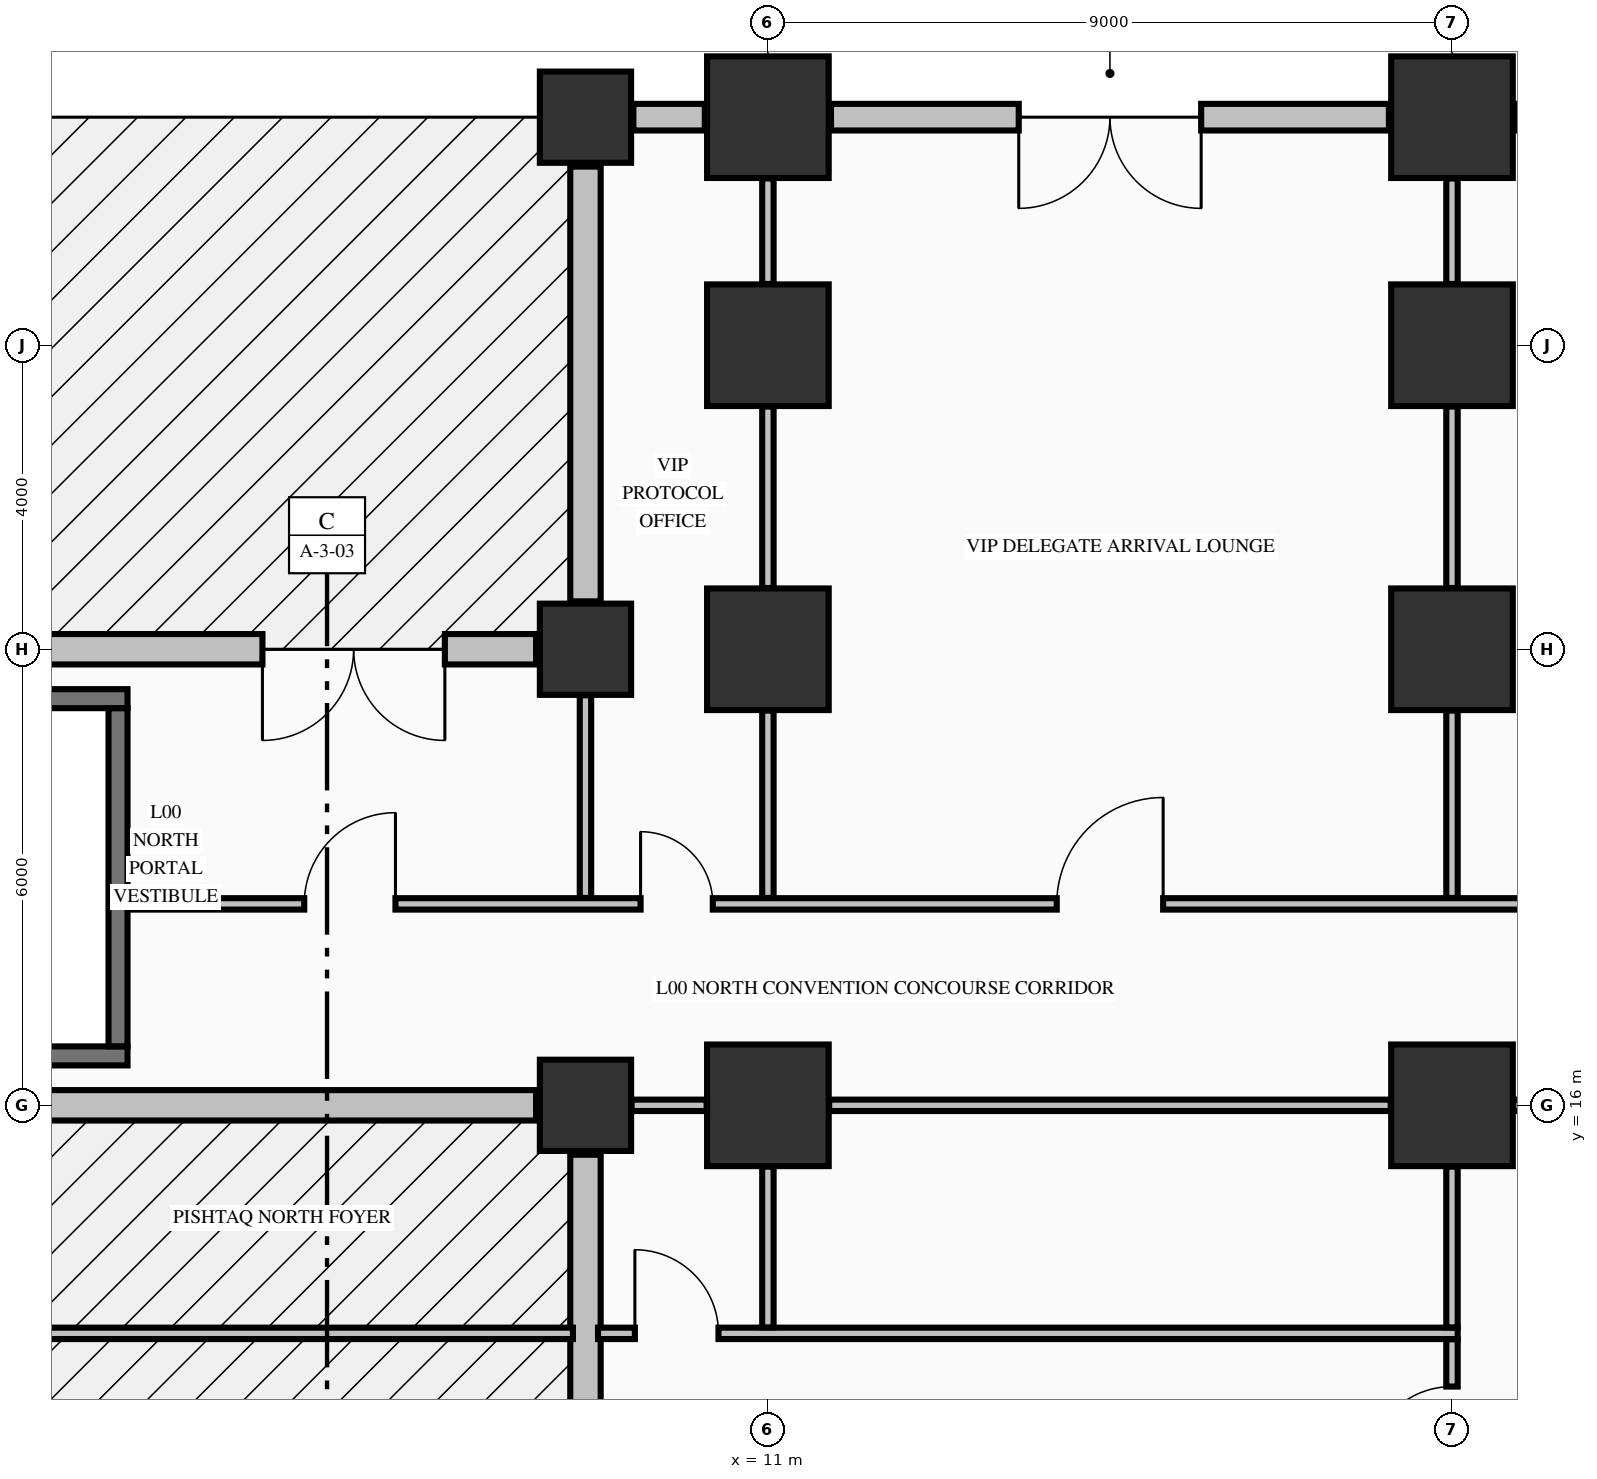
"""IFC4 building model, lengths in metres.
Left out: names, types, materials, properties, quantities, classifications, styles, units other than length and angle.
Written with IfcOpenShell. Run it as: python <this file> out.ifc"""

import sys

from ifc_helpers import new_model, si_unit, direction, frame, frame_2d, origin, origin_2d, place, context, subcontext, project, spatial, rectangle, extrude, element, fill, save


model = new_model("IFC4")
c1 = context("Model", 3, precision=1e-05, world=origin(), true_north=direction((0.0, 1.0)))
c2 = subcontext(c1, "Body", "Model", "MODEL_VIEW")
j1 = project(units=[si_unit("LENGTHUNIT", "METRE"), si_unit("PLANEANGLEUNIT", "RADIAN")], contexts=[c1])
p1 = place(None, origin())
s1 = spatial("IfcSite", under=j1, at=p1, CompositionType="ELEMENT")
p2 = place(p1, origin())
s2 = spatial("IfcBuilding", under=s1, at=p2, CompositionType="ELEMENT")
p3 = place(p2, origin())
s3 = spatial("IfcBuildingStorey", under=s2, at=p3, CompositionType="ELEMENT", Elevation=0.0)
for number, where, z_axis, x_axis in (
    (1, (11.0, 16.0, 0.0), (0.0, 0.0, 1.0), (1.0, 0.0, 0.0)),
    (2, (11.0, 22.0, 0.0), (0.0, 0.0, 1.0), (1.0, 0.0, 0.0)),
    (3, (11.0, 26.0, 0.0), (0.0, 0.0, 1.0), (1.0, 0.0, 0.0)),
    (4, (11.0, 29.0, 0.0), (0.0, 0.0, 1.0), (1.0, 0.0, 0.0)),
    (5, (20.0, 16.0, 0.0), (0.0, 0.0, 1.0), (1.0, 0.0, 0.0)),
    (6, (20.0, 22.0, 0.0), (0.0, 0.0, 1.0), (1.0, 0.0, 0.0)),
    (7, (20.0, 26.0, 0.0), (0.0, 0.0, 1.0), (1.0, 0.0, 0.0)),
    (8, (20.0, 29.0, 0.0), (0.0, 0.0, 1.0), (1.0, 0.0, 0.0)),
):
    element("IfcColumn", number, at=place(p3, frame(where, z_axis=z_axis, x_axis=x_axis)), inside=s3, PredefinedType="COLUMN", context=c2, shape_type="SweptSolid", body=[
        extrude(rectangle(XDim=1.6, YDim=1.6, at=origin_2d()), origin(), (0.0, 0.0, 1.0), 5.09),
    ])
for number, where, z_axis, x_axis in (
    (9, (8.6, 16.0, 0.0), (0.0, 0.0, 1.0), (1.0, 0.0, 0.0)),
    (10, (8.6, 22.0, 0.0), (0.0, 0.0, 1.0), (1.0, 0.0, 0.0)),
    (11, (8.6, 29.0, 0.0), (0.0, 0.0, 1.0), (1.0, 0.0, 0.0)),
):
    element("IfcColumn", number, at=place(p3, frame(where, z_axis=z_axis, x_axis=x_axis)), inside=s3, PredefinedType="COLUMN", context=c2, shape_type="SweptSolid", body=[
        extrude(rectangle(XDim=1.2, YDim=1.2, at=origin_2d()), origin(), (0.0, 0.0, 1.0), 5.09),
    ])
p4 = place(p3, frame((10.17, 29.0, 0.0), z_axis=(0.0, 0.0, 1.0), x_axis=(-1.0, 0.0, 0.0)))
e12 = element("IfcWall", 12, at=p4, inside=s3, PredefinedType="STANDARD", context=c2, shape_type="SweptSolid", body=[
    extrude(rectangle(XDim=0.94, YDim=0.35, at=frame_2d((0.47, 0.0))), origin(), (0.0, 0.0, 1.0), 4.482),
])
p5 = place(p3, frame((19.17, 29.0, 0.0), z_axis=(0.0, 0.0, 1.0), x_axis=(-1.0, 0.0, 0.0)))
e13 = element("IfcWall", 13, at=p5, inside=s3, PredefinedType="STANDARD", context=c2, shape_type="SweptSolid", body=[
    extrude(rectangle(XDim=7.34, YDim=0.35, at=frame_2d((3.67, 0.0))), origin(), (0.0, 0.0, 1.0), 4.482),
])
p6 = place(p5, frame((2.47, 0.0, 0.0)))
e14 = element("IfcOpeningElement", 14, at=p6, cuts=e13, PredefinedType="OPENING", context=c2, shape_type="SweptSolid", body=[
    extrude(rectangle(XDim=2.4, YDim=2.6, at=frame_2d((1.2, 1.3))), frame((0.0, 0.185, 0.0), z_axis=(0.0, -1.0, 0.0), x_axis=(1.0, 0.0, 0.0)), (0.0, 0.0, 1.0), 0.37),
])
p7 = place(p3, frame((22.62, 29.0, 0.0), z_axis=(0.0, 0.0, 1.0), x_axis=(-1.0, 0.0, 0.0)))
e15 = element("IfcWall", 15, at=p7, inside=s3, PredefinedType="STANDARD", context=c2, shape_type="SweptSolid", body=[
    extrude(rectangle(XDim=1.79, YDim=0.35, at=frame_2d((0.895, 0.0))), origin(), (0.0, 0.0, 1.0), 4.482),
])
p8 = place(p3, frame((8.6, 15.35, 0.0), z_axis=(0.0, 0.0, 1.0), x_axis=(0.0, -1.0, 0.0)))
e16 = element("IfcWall", 16, at=p8, inside=s3, PredefinedType="STANDARD", context=c2, shape_type="SweptSolid", body=[
    extrude(rectangle(XDim=14.7, YDim=0.4, at=frame_2d((7.35, 0.0))), origin(), (0.0, 0.0, 1.0), 4.132),
])
p9 = place(p3, frame((0.73, 16.0, 0.0), z_axis=(0.0, 0.0, 1.0), x_axis=(1.0, 0.0, 0.0)))
e17 = element("IfcWall", 17, at=p9, inside=s3, PredefinedType="STANDARD", context=c2, shape_type="SweptSolid", body=[
    extrude(rectangle(XDim=7.22, YDim=0.4, at=frame_2d((3.61, 0.0))), origin(), (0.0, 0.0, 1.0), 4.132),
])
p10 = place(p3, frame((8.6, 28.35, 0.0), z_axis=(0.0, 0.0, 1.0), x_axis=(0.0, -1.0, 0.0)))
e18 = element("IfcWall", 18, at=p10, inside=s3, PredefinedType="STANDARD", context=c2, shape_type="SweptSolid", body=[
    extrude(rectangle(XDim=5.72, YDim=0.4, at=frame_2d((2.86, 0.0))), origin(), (0.0, 0.0, 1.0), 4.132),
])
p11 = place(p3, frame((7.95, 22.0, 0.0), z_axis=(0.0, 0.0, 1.0), x_axis=(-1.0, 0.0, 0.0)))
e19 = element("IfcWall", 19, at=p11, inside=s3, PredefinedType="STANDARD", context=c2, shape_type="SweptSolid", body=[
    extrude(rectangle(XDim=15.9, YDim=0.4, at=frame_2d((7.95, 0.0))), origin(), (0.0, 0.0, 1.0), 4.132),
])
p12 = place(p11, frame((1.2, 0.0, 0.0)))
e20 = element("IfcOpeningElement", 20, at=p12, cuts=e19, PredefinedType="OPENING", context=c2, shape_type="SweptSolid", body=[
    extrude(rectangle(XDim=2.4, YDim=2.6, at=frame_2d((1.2, 1.3))), frame((0.0, 0.21, 0.0), z_axis=(0.0, -1.0, 0.0), x_axis=(1.0, 0.0, 0.0)), (0.0, 0.0, 1.0), 0.42),
])
p13 = place(p3, frame((0.704, 16.65, 0.0), z_axis=(0.0, 0.0, 1.0), x_axis=(1.0, 0.0, 0.0)))
e21 = element("IfcWall", 21, at=p13, inside=s3, PredefinedType="SOLIDWALL", context=c2, shape_type="SweptSolid", body=[
    extrude(rectangle(XDim=1.871, YDim=0.25, at=frame_2d((0.936, 0.0))), origin(), (0.0, 0.0, 1.0), 5.09),
])
p14 = place(p3, frame((-7.996, 21.35, 0.0), z_axis=(0.0, 0.0, 1.0), x_axis=(1.0, 0.0, 0.0)))
e22 = element("IfcWall", 22, at=p14, inside=s3, PredefinedType="SOLIDWALL", context=c2, shape_type="SweptSolid", body=[
    extrude(rectangle(XDim=10.571, YDim=0.25, at=frame_2d((5.286, 0.0))), origin(), (0.0, 0.0, 1.0), 5.09),
])
p15 = place(p3, frame((-8.435, 13.0, 0.0), z_axis=(0.0, 0.0, 1.0), x_axis=(1.0, 0.0, 0.0)))
e23 = element("IfcWall", 23, at=p15, inside=s3, PredefinedType="PARTITIONING", context=c2, shape_type="SweptSolid", body=[
    extrude(rectangle(XDim=16.87, YDim=0.15, at=frame_2d((8.435, 0.0))), origin(), (0.0, 0.0, 1.0), 5.09),
])
p16 = place(p15, frame((7.835, 0.0, 0.0)))
e24 = element("IfcOpeningElement", 24, at=p16, cuts=e23, PredefinedType="OPENING", context=c2, shape_type="SweptSolid", body=[
    extrude(rectangle(XDim=1.2, YDim=2.15, at=frame_2d((0.6, 1.075))), frame((0.0, 0.085, 0.0), z_axis=(0.0, -1.0, 0.0), x_axis=(1.0, 0.0, 0.0)), (0.0, 0.0, 1.0), 0.17),
])
p17 = place(p3, frame((8.765, 13.0, 0.0), z_axis=(0.0, 0.0, 1.0), x_axis=(1.0, 0.0, 0.0)))
e25 = element("IfcWall", 25, at=p17, inside=s3, PredefinedType="PARTITIONING", context=c2, shape_type="SweptSolid", body=[
    extrude(rectangle(XDim=11.31, YDim=0.15, at=frame_2d((5.655, 0.0))), origin(), (0.0, 0.0, 1.0), 5.09),
])
p18 = place(p17, frame((0.485, 0.0, 0.0)))
e26 = element("IfcOpeningElement", 26, at=p18, cuts=e25, PredefinedType="OPENING", context=c2, shape_type="SweptSolid", body=[
    extrude(rectangle(XDim=1.1, YDim=2.15, at=frame_2d((0.55, 1.075))), frame((0.0, 0.085, 0.0), z_axis=(0.0, -1.0, 0.0), x_axis=(1.0, 0.0, 0.0)), (0.0, 0.0, 1.0), 0.17),
])
p19 = place(p3, frame((9.206, 16.0, 0.0), z_axis=(0.0, 0.0, 1.0), x_axis=(1.0, 0.0, 0.0)))
e27 = element("IfcWall", 27, at=p19, inside=s3, PredefinedType="PARTITIONING", context=c2, shape_type="SweptSolid", body=[
    extrude(rectangle(XDim=0.988, YDim=0.15, at=frame_2d((0.494, 0.0))), origin(), (0.0, 0.0, 1.0), 4.132),
])
p20 = place(p3, frame((11.806, 16.0, 0.0), z_axis=(0.0, 0.0, 1.0), x_axis=(1.0, 0.0, 0.0)))
e28 = element("IfcWall", 28, at=p20, inside=s3, PredefinedType="PARTITIONING", context=c2, shape_type="SweptSolid", body=[
    extrude(rectangle(XDim=7.388, YDim=0.15, at=frame_2d((3.694, 0.0))), origin(), (0.0, 0.0, 1.0), 4.132),
])
p21 = place(p3, frame((20.806, 16.0, 0.0), z_axis=(0.0, 0.0, 1.0), x_axis=(1.0, 0.0, 0.0)))
e29 = element("IfcWall", 29, at=p21, inside=s3, PredefinedType="PARTITIONING", context=c2, shape_type="SweptSolid", body=[
    extrude(rectangle(XDim=4.488, YDim=0.15, at=frame_2d((2.244, 0.0))), origin(), (0.0, 0.0, 1.0), 4.132),
])
p22 = place(p21, frame((0.15, 0.0, 0.0)))
e30 = element("IfcOpeningElement", 30, at=p22, cuts=e29, PredefinedType="OPENING", context=c2, shape_type="SweptSolid", body=[
    extrude(rectangle(XDim=1.1, YDim=2.15, at=frame_2d((0.55, 1.075))), frame((0.0, 0.085, 0.0), z_axis=(0.0, -1.0, 0.0), x_axis=(1.0, 0.0, 0.0)), (0.0, 0.0, 1.0), 0.17),
])
p23 = place(p3, frame((2.578, 18.65, 0.0), z_axis=(0.0, 0.0, 1.0), x_axis=(1.0, 0.0, 0.0)))
e31 = element("IfcWall", 31, at=p23, inside=s3, PredefinedType="PARTITIONING", context=c2, shape_type="SweptSolid", body=[
    extrude(rectangle(XDim=27.272, YDim=0.15, at=frame_2d((13.636, 0.0))), origin(), (0.0, 0.0, 1.0), 5.09),
])
p24 = place(p23, frame((2.322, 0.0, 0.0)))
e32 = element("IfcOpeningElement", 32, at=p24, cuts=e31, PredefinedType="OPENING", context=c2, shape_type="SweptSolid", body=[
    extrude(rectangle(XDim=1.2, YDim=2.15, at=frame_2d((0.6, 1.075))), frame((0.0, 0.085, 0.0), z_axis=(0.0, -1.0, 0.0), x_axis=(1.0, 0.0, 0.0)), (0.0, 0.0, 1.0), 0.17),
])
p25 = place(p23, frame((6.747, 0.0, 0.0)))
e33 = element("IfcOpeningElement", 33, at=p25, cuts=e31, PredefinedType="OPENING", context=c2, shape_type="SweptSolid", body=[
    extrude(rectangle(XDim=0.95, YDim=2.15, at=frame_2d((0.475, 1.075))), frame((0.0, 0.085, 0.0), z_axis=(0.0, -1.0, 0.0), x_axis=(1.0, 0.0, 0.0)), (0.0, 0.0, 1.0), 0.17),
])
p26 = place(p23, frame((12.222, 0.0, 0.0)))
e34 = element("IfcOpeningElement", 34, at=p26, cuts=e31, PredefinedType="OPENING", context=c2, shape_type="SweptSolid", body=[
    extrude(rectangle(XDim=1.4, YDim=2.2, at=frame_2d((0.7, 1.1))), frame((0.0, 0.085, 0.0), z_axis=(0.0, -1.0, 0.0), x_axis=(1.0, 0.0, 0.0)), (0.0, 0.0, 1.0), 0.17),
])
p27 = place(p23, frame((19.897, 0.0, 0.0)))
e35 = element("IfcOpeningElement", 35, at=p27, cuts=e31, PredefinedType="OPENING", context=c2, shape_type="SweptSolid", body=[
    extrude(rectangle(XDim=1.05, YDim=2.15, at=frame_2d((0.525, 1.075))), frame((0.0, 0.085, 0.0), z_axis=(0.0, -1.0, 0.0), x_axis=(1.0, 0.0, 0.0)), (0.0, 0.0, 1.0), 0.17),
])
p28 = place(p23, frame((24.897, 0.0, 0.0)))
e36 = element("IfcOpeningElement", 36, at=p28, cuts=e31, PredefinedType="OPENING", context=c2, shape_type="SweptSolid", body=[
    extrude(rectangle(XDim=0.95, YDim=2.15, at=frame_2d((0.475, 1.075))), frame((0.0, 0.085, 0.0), z_axis=(0.0, -1.0, 0.0), x_axis=(1.0, 0.0, 0.0)), (0.0, 0.0, 1.0), 0.17),
])
p29 = place(p3, frame((2.45, 16.777, 0.0), z_axis=(0.0, 0.0, 1.0), x_axis=(0.0, 1.0, 0.0)))
e37 = element("IfcWall", 37, at=p29, inside=s3, PredefinedType="SOLIDWALL", context=c2, shape_type="SweptSolid", body=[
    extrude(rectangle(XDim=4.446, YDim=0.25, at=frame_2d((2.223, 0.0))), origin(), (0.0, 0.0, 1.0), 5.09),
])
p30 = place(p3, frame((8.6, 18.728, 0.0), z_axis=(0.0, 0.0, 1.0), x_axis=(0.0, 1.0, 0.0)))
e38 = element("IfcWall", 38, at=p30, inside=s3, PredefinedType="PARTITIONING", context=c2, shape_type="SweptSolid", body=[
    extrude(rectangle(XDim=2.666, YDim=0.15, at=frame_2d((1.333, 0.0))), origin(), (0.0, 0.0, 1.0), 4.132),
])
p31 = place(p3, frame((11.0, 13.078, 0.0), z_axis=(0.0, 0.0, 1.0), x_axis=(0.0, 1.0, 0.0)))
e39 = element("IfcWall", 39, at=p31, inside=s3, PredefinedType="PARTITIONING", context=c2, shape_type="SweptSolid", body=[
    extrude(rectangle(XDim=2.116, YDim=0.15, at=frame_2d((1.058, 0.0))), origin(), (0.0, 0.0, 1.0), 4.132),
])
p32 = place(p3, frame((11.0, 18.728, 0.0), z_axis=(0.0, 0.0, 1.0), x_axis=(0.0, 1.0, 0.0)))
e40 = element("IfcWall", 40, at=p32, inside=s3, PredefinedType="PARTITIONING", context=c2, shape_type="SweptSolid", body=[
    extrude(rectangle(XDim=2.466, YDim=0.15, at=frame_2d((1.233, 0.0))), origin(), (0.0, 0.0, 1.0), 4.132),
])
p33 = place(p3, frame((11.0, 22.806, 0.0), z_axis=(0.0, 0.0, 1.0), x_axis=(0.0, 1.0, 0.0)))
e41 = element("IfcWall", 41, at=p33, inside=s3, PredefinedType="PARTITIONING", context=c2, shape_type="SweptSolid", body=[
    extrude(rectangle(XDim=2.388, YDim=0.15, at=frame_2d((1.194, 0.0))), origin(), (0.0, 0.0, 1.0), 4.132),
])
p34 = place(p3, frame((11.0, 26.806, 0.0), z_axis=(0.0, 0.0, 1.0), x_axis=(0.0, 1.0, 0.0)))
e42 = element("IfcWall", 42, at=p34, inside=s3, PredefinedType="PARTITIONING", context=c2, shape_type="SweptSolid", body=[
    extrude(rectangle(XDim=1.388, YDim=0.15, at=frame_2d((0.694, 0.0))), origin(), (0.0, 0.0, 1.0), 4.132),
])
p35 = place(p3, frame((20.0, 10.678, 0.0), z_axis=(0.0, 0.0, 1.0), x_axis=(0.0, 1.0, 0.0)))
e43 = element("IfcWall", 43, at=p35, inside=s3, PredefinedType="PARTITIONING", context=c2, shape_type="SweptSolid", body=[
    extrude(rectangle(XDim=2.244, YDim=0.15, at=frame_2d((1.122, 0.0))), origin(), (0.0, 0.0, 1.0), 4.132),
])
p36 = place(p35, frame((0.522, 0.0, 0.0)))
e44 = element("IfcOpeningElement", 44, at=p36, cuts=e43, PredefinedType="OPENING", context=c2, shape_type="SweptSolid", body=[
    extrude(rectangle(XDim=1.1, YDim=2.15, at=frame_2d((0.55, 1.075))), frame((0.0, 0.085, 0.0), z_axis=(0.0, -1.0, 0.0), x_axis=(1.0, 0.0, 0.0)), (0.0, 0.0, 1.0), 0.17),
])
p37 = place(p3, frame((20.0, 13.078, 0.0), z_axis=(0.0, 0.0, 1.0), x_axis=(0.0, 1.0, 0.0)))
e45 = element("IfcWall", 45, at=p37, inside=s3, PredefinedType="PARTITIONING", context=c2, shape_type="SweptSolid", body=[
    extrude(rectangle(XDim=2.116, YDim=0.15, at=frame_2d((1.058, 0.0))), origin(), (0.0, 0.0, 1.0), 4.132),
])
p38 = place(p3, frame((20.0, 18.728, 0.0), z_axis=(0.0, 0.0, 1.0), x_axis=(0.0, 1.0, 0.0)))
e46 = element("IfcWall", 46, at=p38, inside=s3, PredefinedType="PARTITIONING", context=c2, shape_type="SweptSolid", body=[
    extrude(rectangle(XDim=2.466, YDim=0.15, at=frame_2d((1.233, 0.0))), origin(), (0.0, 0.0, 1.0), 4.132),
])
p39 = place(p3, frame((20.0, 22.806, 0.0), z_axis=(0.0, 0.0, 1.0), x_axis=(0.0, 1.0, 0.0)))
e47 = element("IfcWall", 47, at=p39, inside=s3, PredefinedType="PARTITIONING", context=c2, shape_type="SweptSolid", body=[
    extrude(rectangle(XDim=2.388, YDim=0.15, at=frame_2d((1.194, 0.0))), origin(), (0.0, 0.0, 1.0), 4.132),
])
p40 = place(p3, frame((20.0, 26.806, 0.0), z_axis=(0.0, 0.0, 1.0), x_axis=(0.0, 1.0, 0.0)))
e48 = element("IfcWall", 48, at=p40, inside=s3, PredefinedType="PARTITIONING", context=c2, shape_type="SweptSolid", body=[
    extrude(rectangle(XDim=1.388, YDim=0.15, at=frame_2d((0.694, 0.0))), origin(), (0.0, 0.0, 1.0), 4.132),
])
p41 = place(p6, origin())
e49 = element("IfcDoor", 49, at=p41, inside=s3, OperationType="DOUBLE_DOOR_DOUBLE_SWING", PredefinedType="DOOR", context=c2, shape_type="SweptSolid", body=[
    extrude(rectangle(XDim=2.4, YDim=2.6, at=frame_2d((1.2, 1.3))), frame((0.0, 0.025, 0.0), z_axis=(0.0, -1.0, 0.0), x_axis=(1.0, 0.0, 0.0)), (0.0, 0.0, 1.0), 0.05),
])
fill(e14, e49)
p42 = place(p12, origin())
e50 = element("IfcDoor", 50, at=p42, inside=s3, OperationType="DOUBLE_DOOR_DOUBLE_SWING", PredefinedType="DOOR", context=c2, shape_type="SweptSolid", body=[
    extrude(rectangle(XDim=2.4, YDim=2.6, at=frame_2d((1.2, 1.3))), frame((0.0, 0.025, 0.0), z_axis=(0.0, -1.0, 0.0), x_axis=(1.0, 0.0, 0.0)), (0.0, 0.0, 1.0), 0.05),
])
fill(e20, e50)
p43 = place(p18, origin())
e51 = element("IfcDoor", 51, at=p43, inside=s3, OperationType="SINGLE_SWING_LEFT", PredefinedType="DOOR", context=c2, shape_type="SweptSolid", body=[
    extrude(rectangle(XDim=1.1, YDim=2.15, at=frame_2d((0.55, 1.075))), frame((0.0, 0.025, 0.0), z_axis=(0.0, -1.0, 0.0), x_axis=(1.0, 0.0, 0.0)), (0.0, 0.0, 1.0), 0.05),
])
fill(e26, e51)
p44 = place(p36, origin())
e52 = element("IfcDoor", 52, at=p44, inside=s3, OperationType="SINGLE_SWING_LEFT", PredefinedType="DOOR", context=c2, shape_type="SweptSolid", body=[
    extrude(rectangle(XDim=1.1, YDim=2.15, at=frame_2d((0.55, 1.075))), frame((0.0, 0.025, 0.0), z_axis=(0.0, -1.0, 0.0), x_axis=(1.0, 0.0, 0.0)), (0.0, 0.0, 1.0), 0.05),
])
fill(e44, e52)
p45 = place(p24, origin())
e53 = element("IfcDoor", 53, at=p45, inside=s3, OperationType="SINGLE_SWING_RIGHT", PredefinedType="DOOR", context=c2, shape_type="SweptSolid", body=[
    extrude(rectangle(XDim=1.2, YDim=2.15, at=frame_2d((0.6, 1.075))), frame((0.0, 0.025, 0.0), z_axis=(0.0, -1.0, 0.0), x_axis=(1.0, 0.0, 0.0)), (0.0, 0.0, 1.0), 0.05),
])
fill(e32, e53)
p46 = place(p25, origin())
e54 = element("IfcDoor", 54, at=p46, inside=s3, OperationType="SINGLE_SWING_LEFT", PredefinedType="DOOR", context=c2, shape_type="SweptSolid", body=[
    extrude(rectangle(XDim=0.95, YDim=2.15, at=frame_2d((0.475, 1.075))), frame((0.0, 0.025, 0.0), z_axis=(0.0, -1.0, 0.0), x_axis=(1.0, 0.0, 0.0)), (0.0, 0.0, 1.0), 0.05),
])
fill(e33, e54)
p47 = place(p26, origin())
e55 = element("IfcDoor", 55, at=p47, inside=s3, OperationType="SINGLE_SWING_RIGHT", PredefinedType="DOOR", context=c2, shape_type="SweptSolid", body=[
    extrude(rectangle(XDim=1.4, YDim=2.2, at=frame_2d((0.7, 1.1))), frame((0.0, 0.025, 0.0), z_axis=(0.0, -1.0, 0.0), x_axis=(1.0, 0.0, 0.0)), (0.0, 0.0, 1.0), 0.05),
])
fill(e34, e55)
save(model, sys.argv[1])
